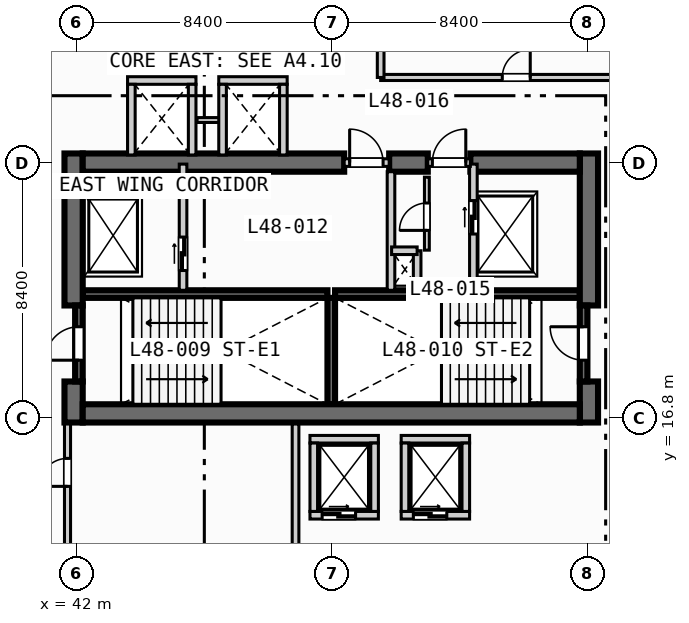
"""IFC4 building model, lengths in metres.
Left out: names, types, materials, properties, quantities, classifications, styles, units other than length and angle.
Written with IfcOpenShell. Run it as: python <this file> out.ifc"""

import sys

from ifc_helpers import new_model, si_unit, direction, frame, frame_2d, origin, place, context, subcontext, project, spatial, rectangle, extrude, element, fill, save


model = new_model("IFC4")
c1 = context("Model", 3, precision=1e-05, world=origin(), true_north=direction((0.0, 1.0)))
c2 = subcontext(c1, "Body", "Model", "MODEL_VIEW")
j1 = project(units=[si_unit("LENGTHUNIT", "METRE"), si_unit("PLANEANGLEUNIT", "RADIAN")], contexts=[c1])
p1 = place(None, origin())
s1 = spatial("IfcSite", under=j1, at=p1, CompositionType="ELEMENT")
p2 = place(p1, origin())
s2 = spatial("IfcBuilding", under=s1, at=p2, CompositionType="ELEMENT")
p3 = place(p2, frame((0.0, 0.0, 197.6)))
s3 = spatial("IfcBuildingStorey", under=s2, at=p3, CompositionType="ELEMENT", Elevation=197.6)
for number, where, z_axis, x_axis in (
    (1, (42.2, 20.875, 0.0), (0.0, 0.0, 1.0), (1.0, 0.0, 0.0)),
    (2, (50.5, 20.875, 0.0), (0.0, 0.0, 1.0), (1.0, 0.0, 0.0)),
):
    element("IfcWall", number, at=place(p3, frame(where, z_axis=z_axis, x_axis=x_axis)), inside=s3, PredefinedType="SOLIDWALL", context=c2, shape_type="SweptSolid", body=[
        extrude(rectangle(XDim=8.05, YDim=0.25, at=frame_2d((4.025, 0.0))), origin(), (0.0, 0.0, 1.0), 3.47),
    ])
p4 = place(p3, frame((50.375, 17.25, 0.0), z_axis=(0.0, 0.0, 1.0), x_axis=(0.0, 1.0, 0.0)))
e3 = element("IfcWall", 3, at=p4, inside=s3, PredefinedType="SOLIDWALL", context=c2, shape_type="SweptSolid", body=[
    extrude(rectangle(XDim=3.5, YDim=0.25, at=frame_2d((1.75, 0.0))), origin(), (0.0, 0.0, 1.0), 3.47),
])
p5 = place(p3, frame((41.9, 16.65, 0.0), z_axis=(0.0, 0.0, 1.0), x_axis=(0.0, 1.0, 0.0)))
e4 = element("IfcWall", 4, at=p5, inside=s3, PredefinedType="SHEAR", context=c2, shape_type="SweptSolid", body=[
    extrude(rectangle(XDim=1.35, YDim=0.6, at=frame_2d((0.675, 0.0))), origin(), (0.0, 0.0, 1.0), 3.47),
])
p6 = place(p3, frame((41.9, 20.5, 0.0), z_axis=(0.0, 0.0, 1.0), x_axis=(0.0, 1.0, 0.0)))
e5 = element("IfcWall", 5, at=p6, inside=s3, PredefinedType="SHEAR", context=c2, shape_type="SweptSolid", body=[
    extrude(rectangle(XDim=5.0, YDim=0.6, at=frame_2d((2.5, 0.0))), origin(), (0.0, 0.0, 1.0), 3.47),
])
p7 = place(p3, frame((58.85, 16.65, 0.0), z_axis=(0.0, 0.0, 1.0), x_axis=(0.0, 1.0, 0.0)))
e6 = element("IfcWall", 6, at=p7, inside=s3, PredefinedType="SHEAR", context=c2, shape_type="SweptSolid", body=[
    extrude(rectangle(XDim=1.35, YDim=0.6, at=frame_2d((0.675, 0.0))), origin(), (0.0, 0.0, 1.0), 3.47),
])
p8 = place(p3, frame((58.85, 20.5, 0.0), z_axis=(0.0, 0.0, 1.0), x_axis=(0.0, 1.0, 0.0)))
e7 = element("IfcWall", 7, at=p8, inside=s3, PredefinedType="SHEAR", context=c2, shape_type="SweptSolid", body=[
    extrude(rectangle(XDim=5.0, YDim=0.6, at=frame_2d((2.5, 0.0))), origin(), (0.0, 0.0, 1.0), 3.47),
])
p9 = place(p3, frame((42.2, 16.95, 0.0), z_axis=(0.0, 0.0, 1.0), x_axis=(1.0, 0.0, 0.0)))
e8 = element("IfcWall", 8, at=p9, inside=s3, PredefinedType="SHEAR", context=c2, shape_type="SweptSolid", body=[
    extrude(rectangle(XDim=16.35, YDim=0.6, at=frame_2d((8.175, 0.0))), origin(), (0.0, 0.0, 1.0), 3.47),
])
p10 = place(p3, frame((42.2, 25.2, 0.0), z_axis=(0.0, 0.0, 1.0), x_axis=(1.0, 0.0, 0.0)))
e9 = element("IfcWall", 9, at=p10, inside=s3, PredefinedType="SHEAR", context=c2, shape_type="SweptSolid", body=[
    extrude(rectangle(XDim=8.6, YDim=0.6, at=frame_2d((4.3, 0.0))), origin(), (0.0, 0.0, 1.0), 3.47),
])
p11 = place(p3, frame((52.28, 25.2, 0.0), z_axis=(0.0, 0.0, 1.0), x_axis=(1.0, 0.0, 0.0)))
e10 = element("IfcWall", 10, at=p11, inside=s3, PredefinedType="SHEAR", context=c2, shape_type="SweptSolid", body=[
    extrude(rectangle(XDim=1.27, YDim=0.6, at=frame_2d((0.635, 0.0))), origin(), (0.0, 0.0, 1.0), 3.47),
])
p12 = place(p3, frame((54.95, 25.2, 0.0), z_axis=(0.0, 0.0, 1.0), x_axis=(1.0, 0.0, 0.0)))
e11 = element("IfcWall", 11, at=p12, inside=s3, PredefinedType="SHEAR", context=c2, shape_type="SweptSolid", body=[
    extrude(rectangle(XDim=3.6, YDim=0.6, at=frame_2d((1.8, 0.0))), origin(), (0.0, 0.0, 1.0), 3.47),
])
p13 = place(p3, frame((42.075, 18.0, 0.0), z_axis=(0.0, 0.0, 1.0), x_axis=(0.0, 1.0, 0.0)))
e12 = element("IfcWall", 12, at=p13, inside=s3, PredefinedType="SOLIDWALL", context=c2, shape_type="SweptSolid", body=[
    extrude(rectangle(XDim=2.5, YDim=0.25, at=frame_2d((1.25, 0.0))), origin(), (0.0, 0.0, 1.0), 3.47),
])
p14 = place(p13, frame((0.7, 0.0, 0.0)))
e13 = element("IfcOpeningElement", 13, at=p14, cuts=e12, PredefinedType="OPENING", context=c2, shape_type="SweptSolid", body=[
    extrude(rectangle(XDim=1.1, YDim=2.15, at=frame_2d((0.55, 1.075))), frame((0.0, 0.135, 0.0), z_axis=(0.0, -1.0, 0.0), x_axis=(1.0, 0.0, 0.0)), (0.0, 0.0, 1.0), 0.27),
])
p15 = place(p3, frame((58.675, 18.0, 0.0), z_axis=(0.0, 0.0, 1.0), x_axis=(0.0, 1.0, 0.0)))
e14 = element("IfcWall", 14, at=p15, inside=s3, PredefinedType="SOLIDWALL", context=c2, shape_type="SweptSolid", body=[
    extrude(rectangle(XDim=2.5, YDim=0.25, at=frame_2d((1.25, 0.0))), origin(), (0.0, 0.0, 1.0), 3.47),
])
p16 = place(p15, frame((0.7, 0.0, 0.0)))
e15 = element("IfcOpeningElement", 15, at=p16, cuts=e14, PredefinedType="OPENING", context=c2, shape_type="SweptSolid", body=[
    extrude(rectangle(XDim=1.1, YDim=2.15, at=frame_2d((0.55, 1.075))), frame((0.0, 0.135, 0.0), z_axis=(0.0, -1.0, 0.0), x_axis=(1.0, 0.0, 0.0)), (0.0, 0.0, 1.0), 0.27),
])
p17 = place(p3, frame((45.5, 21.0, 0.0), z_axis=(0.0, 0.0, 1.0), x_axis=(0.0, 1.0, 0.0)))
e16 = element("IfcWall", 16, at=p17, inside=s3, PredefinedType="SOLIDWALL", context=c2, shape_type="SweptSolid", body=[
    extrude(rectangle(XDim=4.15, YDim=0.25, at=frame_2d((2.075, 0.0))), origin(), (0.0, 0.0, 1.0), 3.47),
])
p18 = place(p17, frame((0.65, 0.0, 0.0)))
e17 = element("IfcOpeningElement", 17, at=p18, cuts=e16, PredefinedType="OPENING", context=c2, shape_type="SweptSolid", body=[
    extrude(rectangle(XDim=1.1, YDim=2.15, at=frame_2d((0.55, 1.075))), frame((0.0, 0.135, 0.0), z_axis=(0.0, -1.0, 0.0), x_axis=(1.0, 0.0, 0.0)), (0.0, 0.0, 1.0), 0.27),
])
p19 = place(p3, frame((50.8, 25.2, 0.0), z_axis=(0.0, 0.0, 1.0), x_axis=(1.0, 0.0, 0.0)))
e18 = element("IfcWall", 18, at=p19, inside=s3, PredefinedType="SOLIDWALL", context=c2, shape_type="SweptSolid", body=[
    extrude(rectangle(XDim=1.48, YDim=0.25, at=frame_2d((0.74, 0.0))), origin(), (0.0, 0.0, 1.0), 3.47),
])
p20 = place(p19, frame((0.18, 0.0, 0.0)))
e19 = element("IfcOpeningElement", 19, at=p20, cuts=e18, PredefinedType="OPENING", context=c2, shape_type="SweptSolid", body=[
    extrude(rectangle(XDim=1.1, YDim=2.15, at=frame_2d((0.55, 1.075))), frame((0.0, 0.135, 0.0), z_axis=(0.0, -1.0, 0.0), x_axis=(1.0, 0.0, 0.0)), (0.0, 0.0, 1.0), 0.27),
])
p21 = place(p3, frame((52.34, 21.0, 0.0), z_axis=(0.0, 0.0, 1.0), x_axis=(0.0, 1.0, 0.0)))
e20 = element("IfcWall", 20, at=p21, inside=s3, PredefinedType="SOLIDWALL", context=c2, shape_type="SweptSolid", body=[
    extrude(rectangle(XDim=3.9, YDim=0.25, at=frame_2d((1.95, 0.0))), origin(), (0.0, 0.0, 1.0), 3.47),
])
p22 = place(p3, frame((55.05, 21.0, 0.0), z_axis=(0.0, 0.0, 1.0), x_axis=(0.0, 1.0, 0.0)))
e21 = element("IfcWall", 21, at=p22, inside=s3, PredefinedType="SOLIDWALL", context=c2, shape_type="SweptSolid", body=[
    extrude(rectangle(XDim=4.15, YDim=0.25, at=frame_2d((2.075, 0.0))), origin(), (0.0, 0.0, 1.0), 3.47),
])
p23 = place(p22, frame((1.85, 0.0, 0.0)))
e22 = element("IfcOpeningElement", 22, at=p23, cuts=e21, PredefinedType="OPENING", context=c2, shape_type="SweptSolid", body=[
    extrude(rectangle(XDim=1.1, YDim=2.15, at=frame_2d((0.55, 1.075))), frame((0.0, 0.135, 0.0), z_axis=(0.0, -1.0, 0.0), x_axis=(1.0, 0.0, 0.0)), (0.0, 0.0, 1.0), 0.27),
])
p24 = place(p3, frame((53.55, 25.2, 0.0), z_axis=(0.0, 0.0, 1.0), x_axis=(1.0, 0.0, 0.0)))
e23 = element("IfcWall", 23, at=p24, inside=s3, PredefinedType="SOLIDWALL", context=c2, shape_type="SweptSolid", body=[
    extrude(rectangle(XDim=1.4, YDim=0.25, at=frame_2d((0.7, 0.0))), origin(), (0.0, 0.0, 1.0), 3.47),
])
p25 = place(p24, frame((0.15, 0.0, 0.0)))
e24 = element("IfcOpeningElement", 24, at=p25, cuts=e23, PredefinedType="OPENING", context=c2, shape_type="SweptSolid", body=[
    extrude(rectangle(XDim=1.1, YDim=2.15, at=frame_2d((0.55, 1.075))), frame((0.0, 0.135, 0.0), z_axis=(0.0, -1.0, 0.0), x_axis=(1.0, 0.0, 0.0)), (0.0, 0.0, 1.0), 0.27),
])
p26 = place(p3, frame((53.2, 21.0, 0.0), z_axis=(0.0, 0.0, 1.0), x_axis=(0.0, 1.0, 0.0)))
e25 = element("IfcWall", 25, at=p26, inside=s3, PredefinedType="SOLIDWALL", context=c2, shape_type="SweptSolid", body=[
    extrude(rectangle(XDim=1.3, YDim=0.25, at=frame_2d((0.65, 0.0))), origin(), (0.0, 0.0, 1.0), 3.47),
])
p27 = place(p3, frame((52.36, 22.3, 0.0), z_axis=(0.0, 0.0, 1.0), x_axis=(1.0, 0.0, 0.0)))
e26 = element("IfcWall", 26, at=p27, inside=s3, PredefinedType="SOLIDWALL", context=c2, shape_type="SweptSolid", body=[
    extrude(rectangle(XDim=0.84, YDim=0.25, at=frame_2d((0.42, 0.0))), origin(), (0.0, 0.0, 1.0), 3.47),
])
p28 = place(p3, frame((53.52, 22.32, 0.0), z_axis=(0.0, 0.0, 1.0), x_axis=(0.0, 1.0, 0.0)))
e27 = element("IfcWall", 27, at=p28, inside=s3, PredefinedType="PARTITIONING", context=c2, shape_type="SweptSolid", body=[
    extrude(rectangle(XDim=2.4, YDim=0.16, at=frame_2d((1.2, 0.0))), origin(), (0.0, 0.0, 1.0), 3.47),
])
p29 = place(p28, frame((0.65, 0.0, 0.0)))
e28 = element("IfcOpeningElement", 28, at=p29, cuts=e27, PredefinedType="OPENING", context=c2, shape_type="SweptSolid", body=[
    extrude(rectangle(XDim=0.9, YDim=2.1, at=frame_2d((0.45, 1.05))), frame((0.0, 0.09, 0.0), z_axis=(0.0, -1.0, 0.0), x_axis=(1.0, 0.0, 0.0)), (0.0, 0.0, 1.0), 0.18),
])
p30 = place(p3, frame((49.675, 13.6, 0.0), z_axis=(0.0, 0.0, 1.0), x_axis=(1.0, 0.0, 0.0)))
e29 = element("IfcWall", 29, at=p30, inside=s3, PredefinedType="SOLIDWALL", context=c2, shape_type="SweptSolid", body=[
    extrude(rectangle(XDim=2.25, YDim=0.25, at=frame_2d((1.125, 0.0))), origin(), (0.0, 0.0, 1.0), 3.47),
])
p31 = place(p30, frame((0.4, 0.0, 0.0)))
e30 = element("IfcOpeningElement", 30, at=p31, cuts=e29, PredefinedType="OPENING", context=c2, shape_type="SweptSolid", body=[
    extrude(rectangle(XDim=1.1, YDim=2.15, at=frame_2d((0.55, 1.075))), frame((0.0, 0.135, 0.0), z_axis=(0.0, -1.0, 0.0), x_axis=(1.0, 0.0, 0.0)), (0.0, 0.0, 1.0), 0.27),
])
for number, where, z_axis, x_axis in (
    (31, (49.675, 16.1, 0.0), (0.0, 0.0, 1.0), (1.0, 0.0, 0.0)),
    (32, (49.8, 13.725, 0.0), (0.0, 0.0, 1.0), (0.0, 1.0, 0.0)),
    (33, (51.8, 13.725, 0.0), (0.0, 0.0, 1.0), (0.0, 1.0, 0.0)),
):
    element("IfcWall", number, at=place(p3, frame(where, z_axis=z_axis, x_axis=x_axis)), inside=s3, PredefinedType="SOLIDWALL", context=c2, shape_type="SweptSolid", body=[
        extrude(rectangle(XDim=2.25, YDim=0.25, at=frame_2d((1.125, 0.0))), origin(), (0.0, 0.0, 1.0), 3.47),
    ])
p32 = place(p3, frame((52.675, 13.6, 0.0), z_axis=(0.0, 0.0, 1.0), x_axis=(1.0, 0.0, 0.0)))
e34 = element("IfcWall", 34, at=p32, inside=s3, PredefinedType="SOLIDWALL", context=c2, shape_type="SweptSolid", body=[
    extrude(rectangle(XDim=2.25, YDim=0.25, at=frame_2d((1.125, 0.0))), origin(), (0.0, 0.0, 1.0), 3.47),
])
p33 = place(p32, frame((0.4, 0.0, 0.0)))
e35 = element("IfcOpeningElement", 35, at=p33, cuts=e34, PredefinedType="OPENING", context=c2, shape_type="SweptSolid", body=[
    extrude(rectangle(XDim=1.1, YDim=2.15, at=frame_2d((0.55, 1.075))), frame((0.0, 0.135, 0.0), z_axis=(0.0, -1.0, 0.0), x_axis=(1.0, 0.0, 0.0)), (0.0, 0.0, 1.0), 0.27),
])
for number, where, z_axis, x_axis in (
    (36, (52.675, 16.1, 0.0), (0.0, 0.0, 1.0), (1.0, 0.0, 0.0)),
    (37, (52.8, 13.725, 0.0), (0.0, 0.0, 1.0), (0.0, 1.0, 0.0)),
    (38, (54.8, 13.725, 0.0), (0.0, 0.0, 1.0), (0.0, 1.0, 0.0)),
    (39, (43.675, 27.9, 0.0), (0.0, 0.0, 1.0), (1.0, 0.0, 0.0)),
):
    element("IfcWall", number, at=place(p3, frame(where, z_axis=z_axis, x_axis=x_axis)), inside=s3, PredefinedType="SOLIDWALL", context=c2, shape_type="SweptSolid", body=[
        extrude(rectangle(XDim=2.25, YDim=0.25, at=frame_2d((1.125, 0.0))), origin(), (0.0, 0.0, 1.0), 3.47),
    ])
for number, where, z_axis, x_axis in (
    (40, (43.8, 25.45, 0.0), (0.0, 0.0, 1.0), (0.0, 1.0, 0.0)),
    (41, (45.8, 25.45, 0.0), (0.0, 0.0, 1.0), (0.0, 1.0, 0.0)),
):
    element("IfcWall", number, at=place(p3, frame(where, z_axis=z_axis, x_axis=x_axis)), inside=s3, PredefinedType="SOLIDWALL", context=c2, shape_type="SweptSolid", body=[
        extrude(rectangle(XDim=2.325, YDim=0.25, at=frame_2d((1.163, 0.0))), origin(), (0.0, 0.0, 1.0), 3.47),
    ])
p34 = place(p3, frame((45.96, 26.6, 0.0), z_axis=(0.0, 0.0, 1.0), x_axis=(1.0, 0.0, 0.0)))
e42 = element("IfcWall", 42, at=p34, inside=s3, PredefinedType="PARTITIONING", context=c2, shape_type="SweptSolid", body=[
    extrude(rectangle(XDim=0.88, YDim=0.16, at=frame_2d((0.44, 0.0))), origin(), (0.0, 0.0, 1.0), 3.47),
])
p35 = place(p3, frame((46.675, 27.9, 0.0), z_axis=(0.0, 0.0, 1.0), x_axis=(1.0, 0.0, 0.0)))
e43 = element("IfcWall", 43, at=p35, inside=s3, PredefinedType="SOLIDWALL", context=c2, shape_type="SweptSolid", body=[
    extrude(rectangle(XDim=2.25, YDim=0.25, at=frame_2d((1.125, 0.0))), origin(), (0.0, 0.0, 1.0), 3.47),
])
for number, where, z_axis, x_axis in (
    (44, (46.8, 25.45, 0.0), (0.0, 0.0, 1.0), (0.0, 1.0, 0.0)),
    (45, (48.8, 25.45, 0.0), (0.0, 0.0, 1.0), (0.0, 1.0, 0.0)),
):
    element("IfcWall", number, at=place(p3, frame(where, z_axis=z_axis, x_axis=x_axis)), inside=s3, PredefinedType="SOLIDWALL", context=c2, shape_type="SweptSolid", body=[
        extrude(rectangle(XDim=2.325, YDim=0.25, at=frame_2d((1.163, 0.0))), origin(), (0.0, 0.0, 1.0), 3.47),
    ])
p36 = place(p3, frame((41.7, 0.35, 0.0), z_axis=(0.0, 0.0, 1.0), x_axis=(0.0, 1.0, 0.0)))
e46 = element("IfcWall", 46, at=p36, inside=s3, PredefinedType="PARTITIONING", context=c2, shape_type="SweptSolid", body=[
    extrude(rectangle(XDim=16.25, YDim=0.2, at=frame_2d((8.125, 0.0))), origin(), (0.0, 0.0, 1.0), 2.82),
])
p37 = place(p36, frame((14.2, 0.0, 0.0)))
e47 = element("IfcOpeningElement", 47, at=p37, cuts=e46, PredefinedType="OPENING", context=c2, shape_type="SweptSolid", body=[
    extrude(rectangle(XDim=0.92, YDim=2.1, at=frame_2d((0.46, 1.05))), frame((0.0, 0.11, 0.0), z_axis=(0.0, -1.0, 0.0), x_axis=(1.0, 0.0, 0.0)), (0.0, 0.0, 1.0), 0.22),
])
p38 = place(p3, frame((49.2, 0.35, 0.0), z_axis=(0.0, 0.0, 1.0), x_axis=(0.0, 1.0, 0.0)))
e48 = element("IfcWall", 48, at=p38, inside=s3, PredefinedType="PARTITIONING", context=c2, shape_type="SweptSolid", body=[
    extrude(rectangle(XDim=16.25, YDim=0.22, at=frame_2d((8.125, 0.0))), origin(), (0.0, 0.0, 1.0), 3.47),
])
p39 = place(p3, frame((52.0, 28.0, 0.0), z_axis=(0.0, 0.0, 1.0), x_axis=(1.0, 0.0, 0.0)))
e49 = element("IfcWall", 49, at=p39, inside=s3, PredefinedType="PARTITIONING", context=c2, shape_type="SweptSolid", body=[
    extrude(rectangle(XDim=23.25, YDim=0.2, at=frame_2d((11.625, 0.0))), origin(), (0.0, 0.0, 1.0), 3.47),
])
p40 = place(p39, frame((4.0, 0.0, 0.0)))
e50 = element("IfcOpeningElement", 50, at=p40, cuts=e49, PredefinedType="OPENING", context=c2, shape_type="SweptSolid", body=[
    extrude(rectangle(XDim=0.92, YDim=2.1, at=frame_2d((0.46, 1.05))), frame((0.0, 0.11, 0.0), z_axis=(0.0, -1.0, 0.0), x_axis=(1.0, 0.0, 0.0)), (0.0, 0.0, 1.0), 0.22),
])
p41 = place(p3, frame((52.0, 28.0, 0.0), z_axis=(0.0, 0.0, 1.0), x_axis=(0.0, 1.0, 0.0)))
e51 = element("IfcWall", 51, at=p41, inside=s3, PredefinedType="PARTITIONING", context=c2, shape_type="SweptSolid", body=[
    extrude(rectangle(XDim=5.3, YDim=0.22, at=frame_2d((2.65, 0.0))), origin(), (0.0, 0.0, 1.0), 3.47),
])
p42 = place(p14, origin())
e52 = element("IfcDoor", 52, at=p42, inside=s3, OperationType="SINGLE_SWING_LEFT", PredefinedType="DOOR", context=c2, shape_type="SweptSolid", body=[
    extrude(rectangle(XDim=1.1, YDim=2.15, at=frame_2d((0.55, 1.075))), frame((0.0, 0.025, 0.0), z_axis=(0.0, -1.0, 0.0), x_axis=(1.0, 0.0, 0.0)), (0.0, 0.0, 1.0), 0.05),
])
fill(e13, e52)
p43 = place(p16, origin())
e53 = element("IfcDoor", 53, at=p43, inside=s3, OperationType="SINGLE_SWING_RIGHT", PredefinedType="DOOR", context=c2, shape_type="SweptSolid", body=[
    extrude(rectangle(XDim=1.1, YDim=2.15, at=frame_2d((0.55, 1.075))), frame((0.0, 0.025, 0.0), z_axis=(0.0, -1.0, 0.0), x_axis=(1.0, 0.0, 0.0)), (0.0, 0.0, 1.0), 0.05),
])
fill(e15, e53)
p44 = place(p18, origin())
e54 = element("IfcDoor", 54, at=p44, inside=s3, OperationType="SLIDING_TO_LEFT", PredefinedType="DOOR", context=c2, shape_type="SweptSolid", body=[
    extrude(rectangle(XDim=1.1, YDim=2.15, at=frame_2d((0.55, 1.075))), frame((0.0, 0.025, 0.0), z_axis=(0.0, -1.0, 0.0), x_axis=(1.0, 0.0, 0.0)), (0.0, 0.0, 1.0), 0.05),
])
fill(e17, e54)
p45 = place(p20, origin())
e55 = element("IfcDoor", 55, at=p45, inside=s3, OperationType="SINGLE_SWING_LEFT", PredefinedType="DOOR", context=c2, shape_type="SweptSolid", body=[
    extrude(rectangle(XDim=1.1, YDim=2.15, at=frame_2d((0.55, 1.075))), frame((0.0, 0.025, 0.0), z_axis=(0.0, -1.0, 0.0), x_axis=(1.0, 0.0, 0.0)), (0.0, 0.0, 1.0), 0.05),
])
fill(e19, e55)
p46 = place(p23, origin())
e56 = element("IfcDoor", 56, at=p46, inside=s3, OperationType="SLIDING_TO_LEFT", PredefinedType="DOOR", context=c2, shape_type="SweptSolid", body=[
    extrude(rectangle(XDim=1.1, YDim=2.15, at=frame_2d((0.55, 1.075))), frame((0.0, 0.025, 0.0), z_axis=(0.0, -1.0, 0.0), x_axis=(1.0, 0.0, 0.0)), (0.0, 0.0, 1.0), 0.05),
])
fill(e22, e56)
p47 = place(p25, origin())
e57 = element("IfcDoor", 57, at=p47, inside=s3, OperationType="SINGLE_SWING_RIGHT", PredefinedType="DOOR", context=c2, shape_type="SweptSolid", body=[
    extrude(rectangle(XDim=1.1, YDim=2.15, at=frame_2d((0.55, 1.075))), frame((0.0, 0.025, 0.0), z_axis=(0.0, -1.0, 0.0), x_axis=(1.0, 0.0, 0.0)), (0.0, 0.0, 1.0), 0.05),
])
fill(e24, e57)
p48 = place(p29, origin())
e58 = element("IfcDoor", 58, at=p48, inside=s3, OperationType="SINGLE_SWING_LEFT", PredefinedType="DOOR", context=c2, shape_type="SweptSolid", body=[
    extrude(rectangle(XDim=0.9, YDim=2.1, at=frame_2d((0.45, 1.05))), frame((0.0, 0.025, 0.0), z_axis=(0.0, -1.0, 0.0), x_axis=(1.0, 0.0, 0.0)), (0.0, 0.0, 1.0), 0.05),
])
fill(e28, e58)
p49 = place(p31, origin())
e59 = element("IfcDoor", 59, at=p49, inside=s3, OperationType="SLIDING_TO_LEFT", PredefinedType="DOOR", context=c2, shape_type="SweptSolid", body=[
    extrude(rectangle(XDim=1.1, YDim=2.15, at=frame_2d((0.55, 1.075))), frame((0.0, 0.025, 0.0), z_axis=(0.0, -1.0, 0.0), x_axis=(1.0, 0.0, 0.0)), (0.0, 0.0, 1.0), 0.05),
])
fill(e30, e59)
p50 = place(p33, origin())
e60 = element("IfcDoor", 60, at=p50, inside=s3, OperationType="SLIDING_TO_LEFT", PredefinedType="DOOR", context=c2, shape_type="SweptSolid", body=[
    extrude(rectangle(XDim=1.1, YDim=2.15, at=frame_2d((0.55, 1.075))), frame((0.0, 0.025, 0.0), z_axis=(0.0, -1.0, 0.0), x_axis=(1.0, 0.0, 0.0)), (0.0, 0.0, 1.0), 0.05),
])
fill(e35, e60)
p51 = place(p37, origin())
e61 = element("IfcDoor", 61, at=p51, inside=s3, OperationType="SINGLE_SWING_LEFT", PredefinedType="DOOR", context=c2, shape_type="SweptSolid", body=[
    extrude(rectangle(XDim=0.92, YDim=2.1, at=frame_2d((0.46, 1.05))), frame((0.0, 0.025, 0.0), z_axis=(0.0, -1.0, 0.0), x_axis=(1.0, 0.0, 0.0)), (0.0, 0.0, 1.0), 0.05),
])
fill(e47, e61)
p52 = place(p40, origin())
e62 = element("IfcDoor", 62, at=p52, inside=s3, OperationType="SINGLE_SWING_RIGHT", PredefinedType="DOOR", context=c2, shape_type="SweptSolid", body=[
    extrude(rectangle(XDim=0.92, YDim=2.1, at=frame_2d((0.46, 1.05))), frame((0.0, 0.025, 0.0), z_axis=(0.0, -1.0, 0.0), x_axis=(1.0, 0.0, 0.0)), (0.0, 0.0, 1.0), 0.05),
])
fill(e50, e62)
save(model, sys.argv[1])
